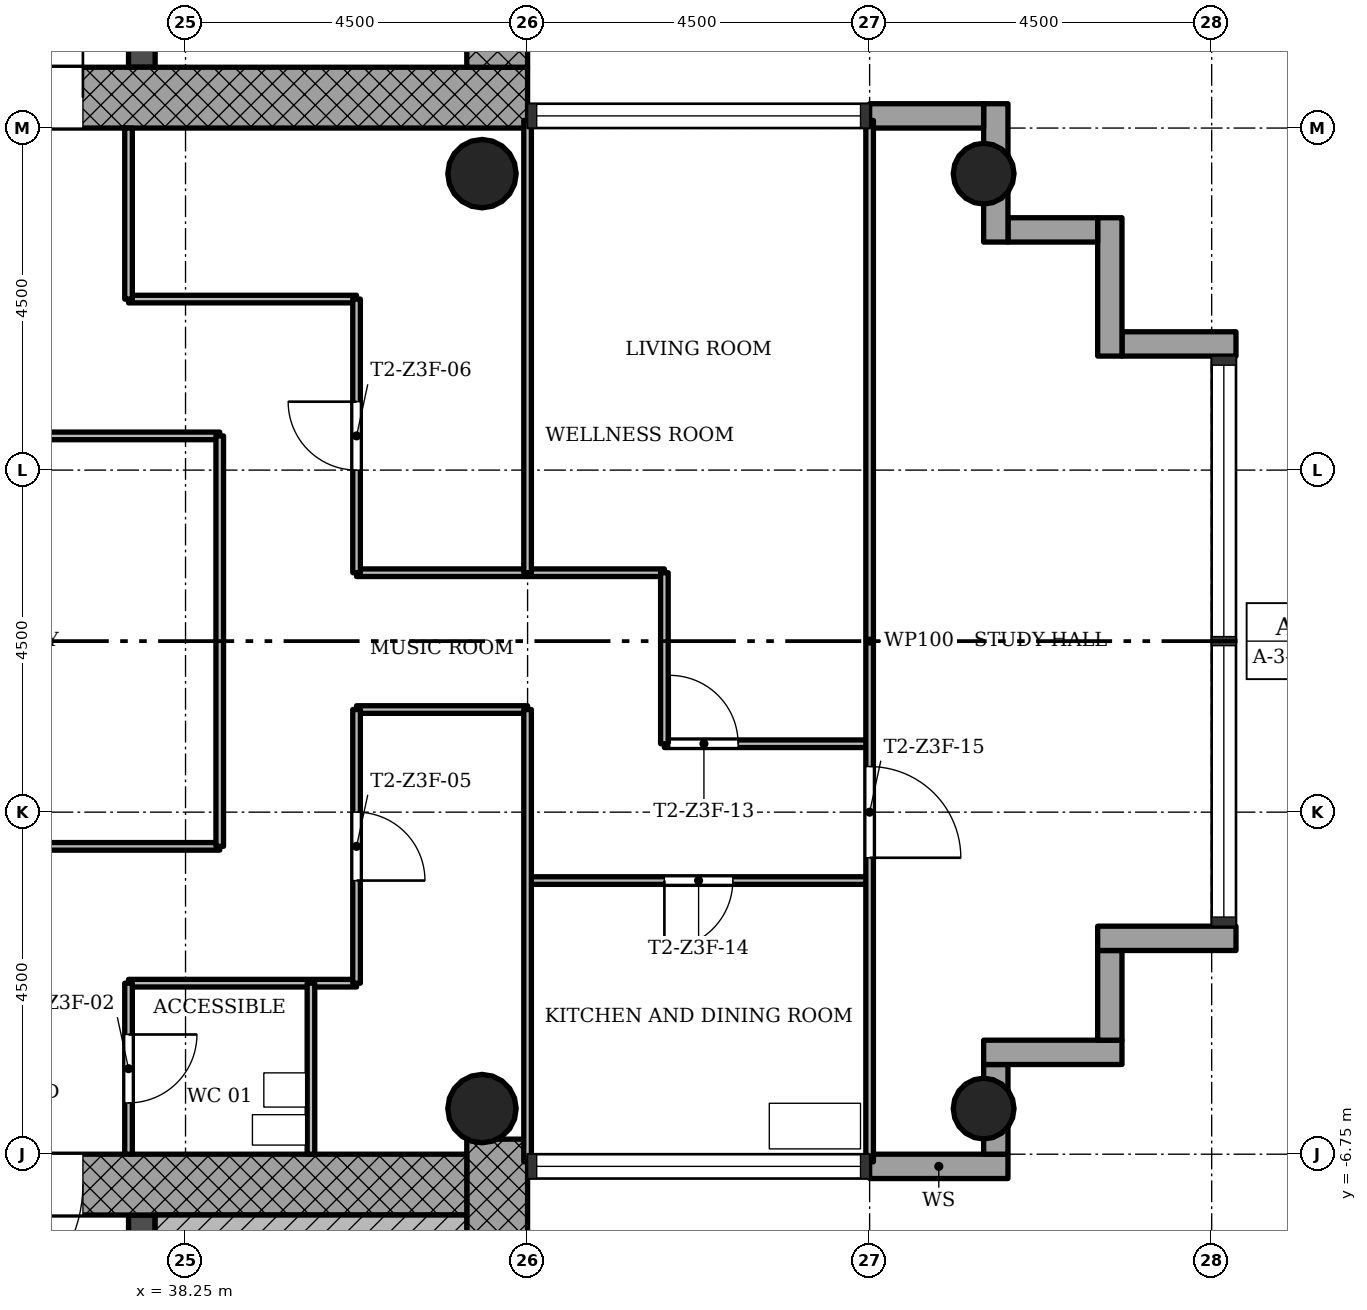
"""IFC4 building model, lengths in metres.
Left out: names, types, materials, properties, quantities, classifications, styles, units other than length and angle.
Written with IfcOpenShell. Run it as: python <this file> out.ifc"""

import sys

from ifc_helpers import new_model, si_unit, direction, frame, frame_2d, origin, origin_2d, place, context, subcontext, project, spatial, rectangle, hollow_circle, extrude, element, fill, save


model = new_model("IFC4")
c1 = context("Model", 3, precision=1e-05, world=origin(), true_north=direction((0.0, 1.0)))
c2 = subcontext(c1, "Body", "Model", "MODEL_VIEW")
j1 = project(units=[si_unit("LENGTHUNIT", "METRE"), si_unit("PLANEANGLEUNIT", "RADIAN")], contexts=[c1])
p1 = place(None, origin())
s1 = spatial("IfcSite", under=j1, at=p1, CompositionType="ELEMENT")
p2 = place(p1, origin())
s2 = spatial("IfcBuilding", under=s1, at=p2, CompositionType="ELEMENT")
p3 = place(p2, frame((0.0, 0.0, 167.7)))
s3 = spatial("IfcBuildingStorey", under=s2, at=p3, CompositionType="ELEMENT", Elevation=167.7)
p4 = place(p3, frame((30.05, 7.15, 0.0), z_axis=(0.0, 0.0, 1.0), x_axis=(1.0, 0.0, 0.0)))
e1 = element("IfcWall", 1, at=p4, inside=s3, PredefinedType="SHEAR", context=c2, shape_type="SweptSolid", body=[
    extrude(rectangle(XDim=12.7, YDim=0.8, at=frame_2d((6.35, 0.0))), origin(), (0.0, 0.0, 1.0), 3.4),
])
p5 = place(p4, frame((5.05, 0.0, 0.0)))
e2 = element("IfcOpeningElement", 2, at=p5, cuts=e1, PredefinedType="OPENING", context=c2, shape_type="SweptSolid", body=[
    extrude(rectangle(XDim=1.8, YDim=2.1, at=frame_2d((0.9, 1.05))), frame((0.0, 0.41, 0.0), z_axis=(0.0, -1.0, 0.0), x_axis=(1.0, 0.0, 0.0)), (0.0, 0.0, 1.0), 0.82),
])
p6 = place(p3, frame((42.35, 7.55, 0.0), z_axis=(0.0, 0.0, 1.0), x_axis=(0.0, 1.0, 0.0)))
e3 = element("IfcWall", 3, at=p6, inside=s3, PredefinedType="SHEAR", context=c2, shape_type="SweptSolid", body=[
    extrude(rectangle(XDim=8.2, YDim=0.8, at=frame_2d((4.1, 0.0))), origin(), (0.0, 0.0, 1.0), 3.4),
])
p7 = place(p3, frame((37.675, 7.55, 0.0), z_axis=(0.0, 0.0, 1.0), x_axis=(0.0, 1.0, 0.0)))
e4 = element("IfcWall", 4, at=p7, inside=s3, PredefinedType="SHEAR", context=c2, shape_type="SweptSolid", body=[
    extrude(rectangle(XDim=7.4, YDim=0.35, at=frame_2d((3.7, 0.0))), origin(), (0.0, 0.0, 1.0), 3.4),
])
p8 = place(p7, frame((0.95, 0.0, 0.0)))
e5 = element("IfcOpeningElement", 5, at=p8, cuts=e4, PredefinedType="OPENING", context=c2, shape_type="SweptSolid", body=[
    extrude(rectangle(XDim=1.1, YDim=2.1, at=frame_2d((0.55, 1.05))), frame((0.0, 0.185, 0.0), z_axis=(0.0, -1.0, 0.0), x_axis=(1.0, 0.0, 0.0)), (0.0, 0.0, 1.0), 0.37),
])
p9 = place(p7, frame((3.15, 0.0, 0.0)))
e6 = element("IfcOpeningElement", 6, at=p9, cuts=e4, PredefinedType="OPENING", context=c2, shape_type="SweptSolid", body=[
    extrude(rectangle(XDim=1.1, YDim=2.1, at=frame_2d((0.55, 1.05))), frame((0.0, 0.185, 0.0), z_axis=(0.0, -1.0, 0.0), x_axis=(1.0, 0.0, 0.0)), (0.0, 0.0, 1.0), 0.37),
])
p10 = place(p7, frame((5.35, 0.0, 0.0)))
e7 = element("IfcOpeningElement", 7, at=p10, cuts=e4, PredefinedType="OPENING", context=c2, shape_type="SweptSolid", body=[
    extrude(rectangle(XDim=1.1, YDim=2.1, at=frame_2d((0.55, 1.05))), frame((0.0, 0.185, 0.0), z_axis=(0.0, -1.0, 0.0), x_axis=(1.0, 0.0, 0.0)), (0.0, 0.0, 1.0), 0.37),
])
p11 = place(p3, frame((42.35, -14.95, 0.0), z_axis=(0.0, 0.0, 1.0), x_axis=(0.0, 1.0, 0.0)))
e8 = element("IfcWall", 8, at=p11, inside=s3, PredefinedType="SHEAR", context=c2, shape_type="SweptSolid", body=[
    extrude(rectangle(XDim=8.398, YDim=0.8, at=frame_2d((4.199, 0.0))), origin(), (0.0, 0.0, 1.0), 3.4),
])
p12 = place(p3, frame((41.95, -7.15, 0.0), z_axis=(0.0, 0.0, 1.0), x_axis=(-1.0, 0.0, 0.0)))
e9 = element("IfcWall", 9, at=p12, inside=s3, PredefinedType="SHEAR", context=c2, shape_type="SweptSolid", body=[
    extrude(rectangle(XDim=12.7, YDim=0.8, at=frame_2d((6.35, 0.0))), origin(), (0.0, 0.0, 1.0), 3.4),
])
p13 = place(p12, frame((5.05, 0.0, 0.0)))
e10 = element("IfcOpeningElement", 10, at=p13, cuts=e9, PredefinedType="OPENING", context=c2, shape_type="SweptSolid", body=[
    extrude(rectangle(XDim=1.8, YDim=2.1, at=frame_2d((0.9, 1.05))), frame((0.0, 0.41, 0.0), z_axis=(0.0, -1.0, 0.0), x_axis=(1.0, 0.0, 0.0)), (0.0, 0.0, 1.0), 0.82),
])
p14 = place(p3, frame((37.675, -14.95, 0.0), z_axis=(0.0, 0.0, 1.0), x_axis=(0.0, 1.0, 0.0)))
e11 = element("IfcWall", 11, at=p14, inside=s3, PredefinedType="SHEAR", context=c2, shape_type="SweptSolid", body=[
    extrude(rectangle(XDim=7.4, YDim=0.35, at=frame_2d((3.7, 0.0))), origin(), (0.0, 0.0, 1.0), 3.4),
])
p15 = place(p14, frame((5.65, 0.0, 0.0)))
e12 = element("IfcOpeningElement", 12, at=p15, cuts=e11, PredefinedType="OPENING", context=c2, shape_type="SweptSolid", body=[
    extrude(rectangle(XDim=0.9, YDim=2.1, at=frame_2d((0.45, 1.05))), frame((0.0, 0.185, 0.0), z_axis=(0.0, -1.0, 0.0), x_axis=(1.0, 0.0, 0.0)), (0.0, 0.0, 1.0), 0.37),
])
for number, where, z_axis, x_axis in (
    (13, (48.75, -6.15, 0.0), (0.0, 0.0, 1.0), (1.0, 0.0, 0.0)),
    (14, (48.75, 6.15, 0.0), (0.0, 0.0, 1.0), (1.0, 0.0, 0.0)),
):
    element("IfcColumn", number, at=place(p3, frame(where, z_axis=z_axis, x_axis=x_axis)), inside=s3, PredefinedType="COLUMN", context=c2, shape_type="SweptSolid", body=[
        extrude(hollow_circle(Radius=0.4, WallThickness=0.028, at=origin_2d()), origin(), (0.0, 0.0, 1.0), 3.4),
    ])
for number, where, z_axis, x_axis in (
    (15, (42.15, -6.15, 0.0), (0.0, 0.0, 1.0), (1.0, 0.0, 0.0)),
    (16, (42.15, 6.15, 0.0), (0.0, 0.0, 1.0), (1.0, 0.0, 0.0)),
):
    element("IfcColumn", number, at=place(p3, frame(where, z_axis=z_axis, x_axis=x_axis)), inside=s3, PredefinedType="COLUMN", context=c2, shape_type="SweptSolid", body=[
        extrude(hollow_circle(Radius=0.45, WallThickness=0.032, at=origin_2d()), origin(), (0.0, 0.0, 1.0), 3.4),
    ])
p16 = place(p3, frame((47.25, -6.91, -0.3), z_axis=(0.0, 0.0, 1.0), x_axis=(1.0, 0.0, 0.0)))
e17 = element("IfcWall", 17, at=p16, inside=s3, PredefinedType="STANDARD", context=c2, shape_type="SweptSolid", body=[
    extrude(rectangle(XDim=1.82, YDim=0.32, at=frame_2d((0.91, 0.0))), origin(), (0.0, 0.0, 1.0), 3.4),
])
p17 = place(p3, frame((48.91, -6.75, -0.3), z_axis=(0.0, 0.0, 1.0), x_axis=(0.0, 1.0, 0.0)))
e18 = element("IfcWall", 18, at=p17, inside=s3, PredefinedType="STANDARD", context=c2, shape_type="SweptSolid", body=[
    extrude(rectangle(XDim=1.18, YDim=0.32, at=frame_2d((0.59, 0.0))), origin(), (0.0, 0.0, 1.0), 3.4),
])
p18 = place(p3, frame((48.75, -5.41, -0.3), z_axis=(0.0, 0.0, 1.0), x_axis=(1.0, 0.0, 0.0)))
e19 = element("IfcWall", 19, at=p18, inside=s3, PredefinedType="STANDARD", context=c2, shape_type="SweptSolid", body=[
    extrude(rectangle(XDim=1.82, YDim=0.32, at=frame_2d((0.91, 0.0))), origin(), (0.0, 0.0, 1.0), 3.4),
])
p19 = place(p3, frame((50.41, -5.25, -0.3), z_axis=(0.0, 0.0, 1.0), x_axis=(0.0, 1.0, 0.0)))
e20 = element("IfcWall", 20, at=p19, inside=s3, PredefinedType="STANDARD", context=c2, shape_type="SweptSolid", body=[
    extrude(rectangle(XDim=1.18, YDim=0.32, at=frame_2d((0.59, 0.0))), origin(), (0.0, 0.0, 1.0), 3.4),
])
p20 = place(p3, frame((50.25, -3.91, -0.3), z_axis=(0.0, 0.0, 1.0), x_axis=(1.0, 0.0, 0.0)))
e21 = element("IfcWall", 21, at=p20, inside=s3, PredefinedType="STANDARD", context=c2, shape_type="SweptSolid", body=[
    extrude(rectangle(XDim=1.82, YDim=0.32, at=frame_2d((0.91, 0.0))), origin(), (0.0, 0.0, 1.0), 3.4),
])
p21 = place(p3, frame((52.07, 3.91, -0.3), z_axis=(0.0, 0.0, 1.0), x_axis=(-1.0, 0.0, 0.0)))
e22 = element("IfcWall", 22, at=p21, inside=s3, PredefinedType="STANDARD", context=c2, shape_type="SweptSolid", body=[
    extrude(rectangle(XDim=1.5, YDim=0.32, at=frame_2d((0.75, 0.0))), origin(), (0.0, 0.0, 1.0), 3.4),
])
p22 = place(p3, frame((50.41, 3.75, -0.3), z_axis=(0.0, 0.0, 1.0), x_axis=(0.0, 1.0, 0.0)))
e23 = element("IfcWall", 23, at=p22, inside=s3, PredefinedType="STANDARD", context=c2, shape_type="SweptSolid", body=[
    extrude(rectangle(XDim=1.82, YDim=0.32, at=frame_2d((0.91, 0.0))), origin(), (0.0, 0.0, 1.0), 3.4),
])
p23 = place(p3, frame((50.25, 5.41, -0.3), z_axis=(0.0, 0.0, 1.0), x_axis=(-1.0, 0.0, 0.0)))
e24 = element("IfcWall", 24, at=p23, inside=s3, PredefinedType="STANDARD", context=c2, shape_type="SweptSolid", body=[
    extrude(rectangle(XDim=1.18, YDim=0.32, at=frame_2d((0.59, 0.0))), origin(), (0.0, 0.0, 1.0), 3.4),
])
p24 = place(p3, frame((48.91, 5.25, -0.3), z_axis=(0.0, 0.0, 1.0), x_axis=(0.0, 1.0, 0.0)))
e25 = element("IfcWall", 25, at=p24, inside=s3, PredefinedType="STANDARD", context=c2, shape_type="SweptSolid", body=[
    extrude(rectangle(XDim=1.82, YDim=0.32, at=frame_2d((0.91, 0.0))), origin(), (0.0, 0.0, 1.0), 3.4),
])
p25 = place(p3, frame((48.75, 6.91, -0.3), z_axis=(0.0, 0.0, 1.0), x_axis=(-1.0, 0.0, 0.0)))
e26 = element("IfcWall", 26, at=p25, inside=s3, PredefinedType="STANDARD", context=c2, shape_type="SweptSolid", body=[
    extrude(rectangle(XDim=1.5, YDim=0.32, at=frame_2d((0.75, 0.0))), origin(), (0.0, 0.0, 1.0), 3.4),
])
p26 = place(p3, frame((40.5, -4.5, 0.0), z_axis=(0.0, 0.0, 1.0), x_axis=(-1.0, 0.0, 0.0)))
e27 = element("IfcWall", 27, at=p26, inside=s3, PredefinedType="PARTITIONING", context=c2, shape_type="SweptSolid", body=[
    extrude(rectangle(XDim=3.0, YDim=0.1, at=frame_2d((1.5, 0.0))), origin(), (0.0, 0.0, 1.0), 3.0),
])
p27 = place(p3, frame((47.25, -3.15, 0.0), z_axis=(0.0, 0.0, 1.0), x_axis=(-1.0, 0.0, 0.0)))
e28 = element("IfcWall", 28, at=p27, inside=s3, PredefinedType="PARTITIONING", context=c2, shape_type="SweptSolid", body=[
    extrude(rectangle(XDim=4.5, YDim=0.1, at=frame_2d((2.25, 0.0))), origin(), (0.0, 0.0, 1.0), 3.0),
])
p28 = place(p27, frame((1.8, 0.0, 0.0)))
e29 = element("IfcOpeningElement", 29, at=p28, cuts=e28, PredefinedType="OPENING", context=c2, shape_type="SweptSolid", body=[
    extrude(rectangle(XDim=0.9, YDim=2.1, at=frame_2d((0.45, 1.05))), frame((0.0, 0.06, 0.0), z_axis=(0.0, -1.0, 0.0), x_axis=(1.0, 0.0, 0.0)), (0.0, 0.0, 1.0), 0.12),
])
p29 = place(p3, frame((38.7, -2.7, 0.0), z_axis=(0.0, 0.0, 1.0), x_axis=(-1.0, 0.0, 0.0)))
e30 = element("IfcWall", 30, at=p29, inside=s3, PredefinedType="PARTITIONING", context=c2, shape_type="SweptSolid", body=[
    extrude(rectangle(XDim=5.4, YDim=0.1, at=frame_2d((2.7, 0.0))), origin(), (0.0, 0.0, 1.0), 3.0),
])
p30 = place(p3, frame((47.25, -1.35, 0.0), z_axis=(0.0, 0.0, 1.0), x_axis=(-1.0, 0.0, 0.0)))
e31 = element("IfcWall", 31, at=p30, inside=s3, PredefinedType="PARTITIONING", context=c2, shape_type="SweptSolid", body=[
    extrude(rectangle(XDim=2.7, YDim=0.1, at=frame_2d((1.35, 0.0))), origin(), (0.0, 0.0, 1.0), 3.0),
])
p31 = place(p30, frame((1.73, 0.0, 0.0)))
e32 = element("IfcOpeningElement", 32, at=p31, cuts=e31, PredefinedType="OPENING", context=c2, shape_type="SweptSolid", body=[
    extrude(rectangle(XDim=0.9, YDim=2.1, at=frame_2d((0.45, 1.05))), frame((0.0, 0.06, 0.0), z_axis=(0.0, -1.0, 0.0), x_axis=(1.0, 0.0, 0.0)), (0.0, 0.0, 1.0), 0.12),
])
p32 = place(p3, frame((42.75, -0.9, 0.0), z_axis=(0.0, 0.0, 1.0), x_axis=(-1.0, 0.0, 0.0)))
e33 = element("IfcWall", 33, at=p32, inside=s3, PredefinedType="PARTITIONING", context=c2, shape_type="SweptSolid", body=[
    extrude(rectangle(XDim=2.25, YDim=0.1, at=frame_2d((1.125, 0.0))), origin(), (0.0, 0.0, 1.0), 3.0),
])
p33 = place(p3, frame((44.55, 0.9, 0.0), z_axis=(0.0, 0.0, 1.0), x_axis=(-1.0, 0.0, 0.0)))
e34 = element("IfcWall", 34, at=p33, inside=s3, PredefinedType="PARTITIONING", context=c2, shape_type="SweptSolid", body=[
    extrude(rectangle(XDim=4.05, YDim=0.1, at=frame_2d((2.025, 0.0))), origin(), (0.0, 0.0, 1.0), 3.0),
])
p34 = place(p3, frame((38.7, 2.7, 0.0), z_axis=(0.0, 0.0, 1.0), x_axis=(-1.0, 0.0, 0.0)))
e35 = element("IfcWall", 35, at=p34, inside=s3, PredefinedType="PARTITIONING", context=c2, shape_type="SweptSolid", body=[
    extrude(rectangle(XDim=5.4, YDim=0.1, at=frame_2d((2.7, 0.0))), origin(), (0.0, 0.0, 1.0), 3.0),
])
p35 = place(p3, frame((40.5, 4.5, 0.0), z_axis=(0.0, 0.0, 1.0), x_axis=(-1.0, 0.0, 0.0)))
e36 = element("IfcWall", 36, at=p35, inside=s3, PredefinedType="PARTITIONING", context=c2, shape_type="SweptSolid", body=[
    extrude(rectangle(XDim=3.0, YDim=0.1, at=frame_2d((1.5, 0.0))), origin(), (0.0, 0.0, 1.0), 3.0),
])
p36 = place(p3, frame((47.25, -6.85, 0.0), z_axis=(0.0, 0.0, 1.0), x_axis=(0.0, 1.0, 0.0)))
e37 = element("IfcWall", 37, at=p36, inside=s3, PredefinedType="PARTITIONING", context=c2, shape_type="SweptSolid", body=[
    extrude(rectangle(XDim=13.7, YDim=0.1, at=frame_2d((6.85, 0.0))), origin(), (0.0, 0.0, 1.0), 3.0),
])
p37 = place(p36, frame((4.0, 0.0, 0.0)))
e38 = element("IfcOpeningElement", 38, at=p37, cuts=e37, PredefinedType="OPENING", context=c2, shape_type="SweptSolid", body=[
    extrude(rectangle(XDim=1.2, YDim=2.1, at=frame_2d((0.6, 1.05))), frame((0.0, 0.06, 0.0), z_axis=(0.0, -1.0, 0.0), x_axis=(1.0, 0.0, 0.0)), (0.0, 0.0, 1.0), 0.12),
])
p38 = place(p3, frame((44.55, -1.35, 0.0), z_axis=(0.0, 0.0, 1.0), x_axis=(0.0, 1.0, 0.0)))
e39 = element("IfcWall", 39, at=p38, inside=s3, PredefinedType="PARTITIONING", context=c2, shape_type="SweptSolid", body=[
    extrude(rectangle(XDim=2.25, YDim=0.1, at=frame_2d((1.125, 0.0))), origin(), (0.0, 0.0, 1.0), 3.0),
])
for number, where, z_axis, x_axis in (
    (40, (42.75, -6.85, 0.0), (0.0, 0.0, 1.0), (0.0, 1.0, 0.0)),
    (41, (42.75, 0.9, 0.0), (0.0, 0.0, 1.0), (0.0, 1.0, 0.0)),
):
    element("IfcWall", number, at=place(p3, frame(where, z_axis=z_axis, x_axis=x_axis)), inside=s3, PredefinedType="PARTITIONING", context=c2, shape_type="SweptSolid", body=[
        extrude(rectangle(XDim=5.95, YDim=0.1, at=frame_2d((2.975, 0.0))), origin(), (0.0, 0.0, 1.0), 3.0),
    ])
p39 = place(p3, frame((40.5, -4.5, 0.0), z_axis=(0.0, 0.0, 1.0), x_axis=(0.0, 1.0, 0.0)))
e42 = element("IfcWall", 42, at=p39, inside=s3, PredefinedType="PARTITIONING", context=c2, shape_type="SweptSolid", body=[
    extrude(rectangle(XDim=3.6, YDim=0.1, at=frame_2d((1.8, 0.0))), origin(), (0.0, 0.0, 1.0), 3.0),
])
p40 = place(p39, frame((1.35, 0.0, 0.0)))
e43 = element("IfcOpeningElement", 43, at=p40, cuts=e42, PredefinedType="OPENING", context=c2, shape_type="SweptSolid", body=[
    extrude(rectangle(XDim=0.9, YDim=2.1, at=frame_2d((0.45, 1.05))), frame((0.0, 0.06, 0.0), z_axis=(0.0, -1.0, 0.0), x_axis=(1.0, 0.0, 0.0)), (0.0, 0.0, 1.0), 0.12),
])
p41 = place(p3, frame((40.5, 0.9, 0.0), z_axis=(0.0, 0.0, 1.0), x_axis=(0.0, 1.0, 0.0)))
e44 = element("IfcWall", 44, at=p41, inside=s3, PredefinedType="PARTITIONING", context=c2, shape_type="SweptSolid", body=[
    extrude(rectangle(XDim=3.6, YDim=0.1, at=frame_2d((1.8, 0.0))), origin(), (0.0, 0.0, 1.0), 3.0),
])
p42 = place(p41, frame((1.35, 0.0, 0.0)))
e45 = element("IfcOpeningElement", 45, at=p42, cuts=e44, PredefinedType="OPENING", context=c2, shape_type="SweptSolid", body=[
    extrude(rectangle(XDim=0.9, YDim=2.1, at=frame_2d((0.45, 1.05))), frame((0.0, 0.06, 0.0), z_axis=(0.0, -1.0, 0.0), x_axis=(1.0, 0.0, 0.0)), (0.0, 0.0, 1.0), 0.12),
])
p43 = place(p3, frame((39.9, -6.75, 0.0), z_axis=(0.0, 0.0, 1.0), x_axis=(0.0, 1.0, 0.0)))
e46 = element("IfcWall", 46, at=p43, inside=s3, PredefinedType="PARTITIONING", context=c2, shape_type="SweptSolid", body=[
    extrude(rectangle(XDim=2.25, YDim=0.1, at=frame_2d((1.125, 0.0))), origin(), (0.0, 0.0, 1.0), 3.0),
])
p44 = place(p3, frame((38.7, -2.7, 0.0), z_axis=(0.0, 0.0, 1.0), x_axis=(0.0, 1.0, 0.0)))
e47 = element("IfcWall", 47, at=p44, inside=s3, PredefinedType="PARTITIONING", context=c2, shape_type="SweptSolid", body=[
    extrude(rectangle(XDim=5.4, YDim=0.1, at=frame_2d((2.7, 0.0))), origin(), (0.0, 0.0, 1.0), 3.0),
])
p45 = place(p3, frame((37.5, -6.75, 0.0), z_axis=(0.0, 0.0, 1.0), x_axis=(0.0, 1.0, 0.0)))
e48 = element("IfcWall", 48, at=p45, inside=s3, PredefinedType="PARTITIONING", context=c2, shape_type="SweptSolid", body=[
    extrude(rectangle(XDim=2.25, YDim=0.1, at=frame_2d((1.125, 0.0))), origin(), (0.0, 0.0, 1.0), 3.0),
])
p46 = place(p45, frame((0.675, 0.0, 0.0)))
e49 = element("IfcOpeningElement", 49, at=p46, cuts=e48, PredefinedType="OPENING", context=c2, shape_type="SweptSolid", body=[
    extrude(rectangle(XDim=0.9, YDim=2.1, at=frame_2d((0.45, 1.05))), frame((0.0, 0.06, 0.0), z_axis=(0.0, -1.0, 0.0), x_axis=(1.0, 0.0, 0.0)), (0.0, 0.0, 1.0), 0.12),
])
p47 = place(p3, frame((37.5, 4.5, 0.0), z_axis=(0.0, 0.0, 1.0), x_axis=(0.0, 1.0, 0.0)))
e50 = element("IfcWall", 50, at=p47, inside=s3, PredefinedType="PARTITIONING", context=c2, shape_type="SweptSolid", body=[
    extrude(rectangle(XDim=2.25, YDim=0.1, at=frame_2d((1.125, 0.0))), origin(), (0.0, 0.0, 1.0), 3.0),
])
p48 = place(p3, frame((37.85, -7.75, 0.0), z_axis=(0.0, 0.0, 1.0), x_axis=(1.0, 0.0, 0.0)))
e51 = element("IfcWall", 51, at=p48, inside=s3, PredefinedType="SHEAR", context=c2, shape_type="SweptSolid", body=[
    extrude(rectangle(XDim=4.1, YDim=0.4, at=frame_2d((2.05, 0.0))), origin(), (0.0, 0.0, 1.0), 3.4),
])
p49 = place(p46, origin())
e52 = element("IfcDoor", 52, at=p49, inside=s3, OperationType="SINGLE_SWING_RIGHT", PredefinedType="DOOR", context=c2, shape_type="SweptSolid", body=[
    extrude(rectangle(XDim=0.9, YDim=2.1, at=frame_2d((0.45, 1.05))), frame((0.0, 0.025, 0.0), z_axis=(0.0, -1.0, 0.0), x_axis=(1.0, 0.0, 0.0)), (0.0, 0.0, 1.0), 0.05),
])
fill(e49, e52)
p50 = place(p40, origin())
e53 = element("IfcDoor", 53, at=p50, inside=s3, OperationType="SINGLE_SWING_LEFT", PredefinedType="DOOR", context=c2, shape_type="SweptSolid", body=[
    extrude(rectangle(XDim=0.9, YDim=2.1, at=frame_2d((0.45, 1.05))), frame((0.0, 0.025, 0.0), z_axis=(0.0, -1.0, 0.0), x_axis=(1.0, 0.0, 0.0)), (0.0, 0.0, 1.0), 0.05),
])
fill(e43, e53)
p51 = place(p42, origin())
e54 = element("IfcDoor", 54, at=p51, inside=s3, OperationType="SINGLE_SWING_LEFT", PredefinedType="DOOR", context=c2, shape_type="SweptSolid", body=[
    extrude(rectangle(XDim=0.9, YDim=2.1, at=frame_2d((0.45, 1.05))), frame((0.0, 0.025, 0.0), z_axis=(0.0, -1.0, 0.0), x_axis=(1.0, 0.0, 0.0)), (0.0, 0.0, 1.0), 0.05),
])
fill(e45, e54)
p52 = place(p31, origin())
e55 = element("IfcDoor", 55, at=p52, inside=s3, OperationType="SINGLE_SWING_RIGHT", PredefinedType="DOOR", context=c2, shape_type="SweptSolid", body=[
    extrude(rectangle(XDim=0.9, YDim=2.1, at=frame_2d((0.45, 1.05))), frame((0.0, 0.025, 0.0), z_axis=(0.0, -1.0, 0.0), x_axis=(1.0, 0.0, 0.0)), (0.0, 0.0, 1.0), 0.05),
])
fill(e32, e55)
p53 = place(p28, origin())
e56 = element("IfcDoor", 56, at=p53, inside=s3, OperationType="SINGLE_SWING_LEFT", PredefinedType="DOOR", context=c2, shape_type="SweptSolid", body=[
    extrude(rectangle(XDim=0.9, YDim=2.1, at=frame_2d((0.45, 1.05))), frame((0.0, 0.025, 0.0), z_axis=(0.0, -1.0, 0.0), x_axis=(1.0, 0.0, 0.0)), (0.0, 0.0, 1.0), 0.05),
])
fill(e29, e56)
p54 = place(p37, origin())
e57 = element("IfcDoor", 57, at=p54, inside=s3, OperationType="SINGLE_SWING_LEFT", PredefinedType="DOOR", context=c2, shape_type="SweptSolid", body=[
    extrude(rectangle(XDim=1.2, YDim=2.1, at=frame_2d((0.6, 1.05))), frame((0.0, 0.025, 0.0), z_axis=(0.0, -1.0, 0.0), x_axis=(1.0, 0.0, 0.0)), (0.0, 0.0, 1.0), 0.05),
])
fill(e38, e57)
p55 = place(p5, origin())
e58 = element("IfcDoor", 58, at=p55, inside=s3, OperationType="SINGLE_SWING_LEFT", PredefinedType="DOOR", context=c2, shape_type="SweptSolid", body=[
    extrude(rectangle(XDim=1.8, YDim=2.1, at=frame_2d((0.9, 1.05))), frame((0.0, 0.025, 0.0), z_axis=(0.0, -1.0, 0.0), x_axis=(1.0, 0.0, 0.0)), (0.0, 0.0, 1.0), 0.05),
])
fill(e2, e58)
p56 = place(p13, origin())
e59 = element("IfcDoor", 59, at=p56, inside=s3, OperationType="SINGLE_SWING_LEFT", PredefinedType="DOOR", context=c2, shape_type="SweptSolid", body=[
    extrude(rectangle(XDim=1.8, YDim=2.1, at=frame_2d((0.9, 1.05))), frame((0.0, 0.025, 0.0), z_axis=(0.0, -1.0, 0.0), x_axis=(1.0, 0.0, 0.0)), (0.0, 0.0, 1.0), 0.05),
])
fill(e10, e59)
save(model, sys.argv[1])
